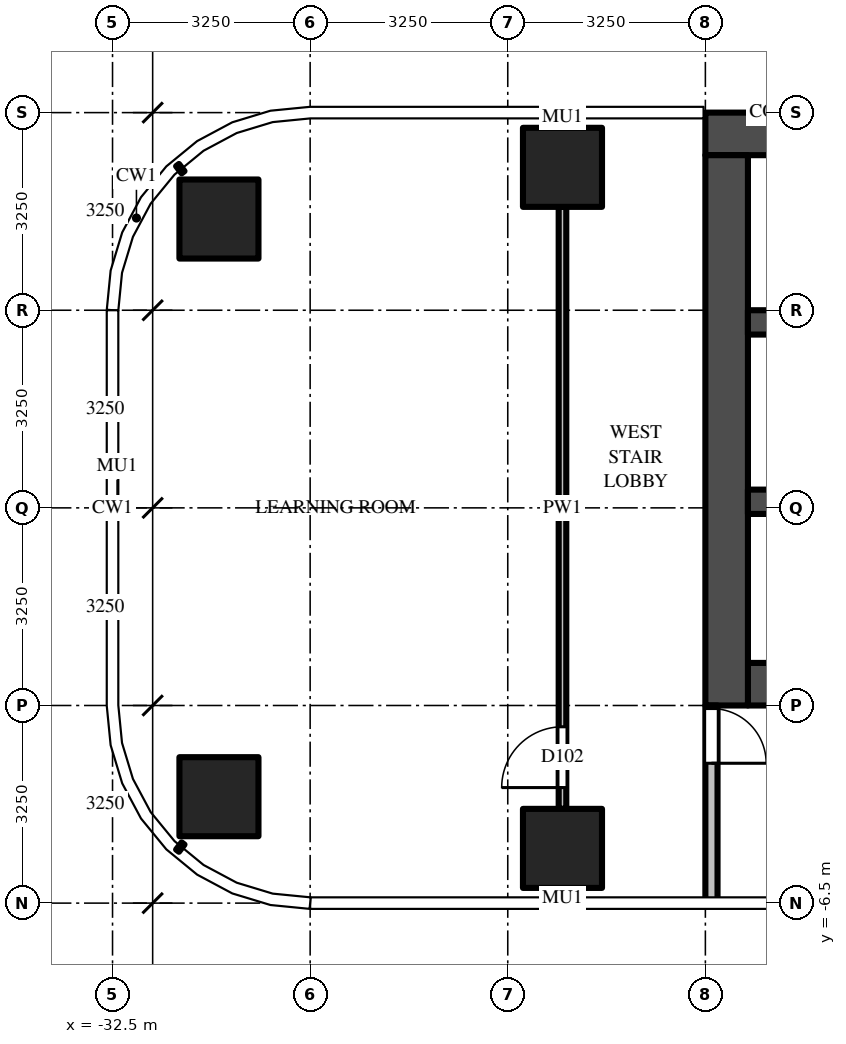
"""IFC4 building model, lengths in metres.
Left out: names, types, materials, properties, quantities, classifications, styles, units other than length and angle.
Written with IfcOpenShell. Run it as: python <this file> out.ifc"""

import sys

from ifc_helpers import new_model, si_unit, direction, frame, frame_2d, origin, origin_2d, place, context, subcontext, project, spatial, rectangle, extrude, source, transform, mapped, element, fill, save


model = new_model("IFC4")
c1 = context("Model", 3, precision=1e-05, world=origin(), true_north=direction((0.0, 1.0)))
c2 = subcontext(c1, "Body", "Model", "MODEL_VIEW")
j1 = project(units=[si_unit("LENGTHUNIT", "METRE"), si_unit("PLANEANGLEUNIT", "RADIAN")], contexts=[c1])
p1 = place(None, origin())
s1 = spatial("IfcSite", under=j1, at=p1, CompositionType="ELEMENT")
p2 = place(p1, origin())
s2 = spatial("IfcBuilding", under=s1, at=p2, CompositionType="ELEMENT")
p3 = place(p2, frame((0.0, 0.0, 115.5)))
s3 = spatial("IfcBuildingStorey", under=s2, at=p3, CompositionType="ELEMENT", Elevation=115.5)
m1 = source(origin(), c2, "Body", "SweptSolid", [
    extrude(rectangle(XDim=1.3, YDim=1.3, at=origin_2d()), origin(), (0.0, 0.0, 1.0), 4.5),
])
for number, where, z_axis, x_axis in (
    (1, (-25.1, -5.6, 0.0), (0.0, 0.0, 1.0), (1.0, 0.0, 0.0)),
    (2, (-30.75, -4.75, 0.0), (0.0, 0.0, 1.0), (1.0, 0.0, 0.0)),
    (3, (-25.1, 5.6, 0.0), (0.0, 0.0, 1.0), (1.0, 0.0, 0.0)),
    (4, (-30.75, 4.75, 0.0), (0.0, 0.0, 1.0), (1.0, 0.0, 0.0)),
):
    element("IfcColumn", number, at=place(p3, frame(where, z_axis=z_axis, x_axis=x_axis)), inside=s3, PredefinedType="COLUMN", context=c2, shape_type="MappedRepresentation", body=[
        mapped(m1, transform((0.0, 0.0, 0.0))),
    ])
m2 = source(origin(), c2, "Body", "SweptSolid", [
    extrude(rectangle(XDim=16.5, YDim=0.7, at=frame_2d((8.25, 0.0))), origin(), (0.0, 0.0, 1.0), 4.25),
])
p4 = place(p3, frame((-6.25, 6.15, 0.0), z_axis=(0.0, 0.0, 1.0), x_axis=(-1.0, 0.0, 0.0)))
e5 = element("IfcWall", 5, at=p4, inside=s3, PredefinedType="SHEAR", context=c2, shape_type="MappedRepresentation", body=[
    mapped(m2, transform((0.0, 0.0, 0.0))),
])
m3 = source(origin(), c2, "Body", "SweptSolid", [
    extrude(rectangle(XDim=14.85, YDim=0.7, at=frame_2d((7.425, 0.0))), origin(), (0.0, 0.0, 1.0), 4.25),
])
p5 = place(p3, frame((-7.2, -2.9, 0.0), z_axis=(0.0, 0.0, 1.0), x_axis=(-1.0, 0.0, 0.0)))
e6 = element("IfcWall", 6, at=p5, inside=s3, PredefinedType="SHEAR", context=c2, shape_type="MappedRepresentation", body=[
    mapped(m3, transform((0.0, 0.0, 0.0))),
])
m4 = source(origin(), c2, "Body", "SweptSolid", [
    extrude(rectangle(XDim=1.3, YDim=2.1, at=frame_2d((0.65, 1.05))), frame((0.0, 0.36, 0.0), z_axis=(0.0, -1.0, 0.0), x_axis=(1.0, 0.0, 0.0)), (0.0, 0.0, 1.0), 0.72),
])
p6 = place(p5, frame((12.2, 0.0, 0.0)))
e7 = element("IfcOpeningElement", 7, at=p6, cuts=e6, PredefinedType="OPENING", context=c2, shape_type="MappedRepresentation", body=[
    mapped(m4, transform((0.0, 0.0, 0.0))),
])
m5 = source(origin(), c2, "Body", "SweptSolid", [
    extrude(rectangle(XDim=1.2, YDim=2.1, at=frame_2d((0.6, 1.05))), frame((0.0, 0.36, 0.0), z_axis=(0.0, -1.0, 0.0), x_axis=(1.0, 0.0, 0.0)), (0.0, 0.0, 1.0), 0.72),
])
p7 = place(p5, frame((9.85, 0.0, 0.0)))
e8 = element("IfcOpeningElement", 8, at=p7, cuts=e6, PredefinedType="OPENING", context=c2, shape_type="MappedRepresentation", body=[
    mapped(m5, transform((0.0, 0.0, 0.0))),
])
m6 = source(origin(), c2, "Body", "SweptSolid", [
    extrude(rectangle(XDim=1.0, YDim=2.1, at=frame_2d((0.5, 1.05))), frame((0.0, 0.36, 0.0), z_axis=(0.0, -1.0, 0.0), x_axis=(1.0, 0.0, 0.0)), (0.0, 0.0, 1.0), 0.72),
])
p8 = place(p5, frame((7.9, 0.0, 0.0)))
e9 = element("IfcOpeningElement", 9, at=p8, cuts=e6, PredefinedType="OPENING", context=c2, shape_type="MappedRepresentation", body=[
    mapped(m6, transform((0.0, 0.0, 0.0))),
])
m7 = source(origin(), c2, "Body", "SweptSolid", [
    extrude(rectangle(XDim=0.8, YDim=2.1, at=frame_2d((0.4, 1.05))), frame((0.0, 0.36, 0.0), z_axis=(0.0, -1.0, 0.0), x_axis=(1.0, 0.0, 0.0)), (0.0, 0.0, 1.0), 0.72),
])
p9 = place(p5, frame((0.113, 0.0, 0.0)))
e10 = element("IfcOpeningElement", 10, at=p9, cuts=e6, PredefinedType="OPENING", context=c2, shape_type="MappedRepresentation", body=[
    mapped(m7, transform((0.0, 0.0, 0.0))),
])
p10 = place(p5, frame((1.288, 0.0, 0.0)))
e11 = element("IfcOpeningElement", 11, at=p10, cuts=e6, PredefinedType="OPENING", context=c2, shape_type="MappedRepresentation", body=[
    mapped(m7, transform((0.0, 0.0, 0.0))),
])
p11 = place(p5, frame((2.712, 0.0, 0.0)))
e12 = element("IfcOpeningElement", 12, at=p11, cuts=e6, PredefinedType="OPENING", context=c2, shape_type="MappedRepresentation", body=[
    mapped(m7, transform((0.0, 0.0, 0.0))),
])
p12 = place(p5, frame((3.887, 0.0, 0.0)))
e13 = element("IfcOpeningElement", 13, at=p12, cuts=e6, PredefinedType="OPENING", context=c2, shape_type="MappedRepresentation", body=[
    mapped(m7, transform((0.0, 0.0, 0.0))),
])
p13 = place(p5, frame((5.312, 0.0, 0.0)))
e14 = element("IfcOpeningElement", 14, at=p13, cuts=e6, PredefinedType="OPENING", context=c2, shape_type="MappedRepresentation", body=[
    mapped(m7, transform((0.0, 0.0, 0.0))),
])
p14 = place(p5, frame((6.488, 0.0, 0.0)))
e15 = element("IfcOpeningElement", 15, at=p14, cuts=e6, PredefinedType="OPENING", context=c2, shape_type="MappedRepresentation", body=[
    mapped(m7, transform((0.0, 0.0, 0.0))),
])
m8 = source(origin(), c2, "Body", "SweptSolid", [
    extrude(rectangle(XDim=9.05, YDim=0.7, at=frame_2d((4.525, 0.0))), origin(), (0.0, 0.0, 1.0), 4.25),
])
p15 = place(p3, frame((-22.4, 5.8, 0.0), z_axis=(0.0, 0.0, 1.0), x_axis=(0.0, -1.0, 0.0)))
e16 = element("IfcWall", 16, at=p15, inside=s3, PredefinedType="SHEAR", context=c2, shape_type="MappedRepresentation", body=[
    mapped(m8, transform((0.0, 0.0, 0.0))),
])
m9 = source(origin(), c2, "Body", "SweptSolid", [
    extrude(rectangle(XDim=14.85, YDim=0.4, at=frame_2d((7.425, 0.0))), origin(), (0.0, 0.0, 1.0), 4.25),
])
p16 = place(p3, frame((-7.2, 0.1, 0.0), z_axis=(0.0, 0.0, 1.0), x_axis=(-1.0, 0.0, 0.0)))
e17 = element("IfcWall", 17, at=p16, inside=s3, PredefinedType="SHEAR", context=c2, shape_type="MappedRepresentation", body=[
    mapped(m9, transform((0.0, 0.0, 0.0))),
])
m10 = source(origin(), c2, "Body", "SweptSolid", [
    extrude(rectangle(XDim=1.0, YDim=2.1, at=frame_2d((0.5, 1.05))), frame((0.0, 0.21, 0.0), z_axis=(0.0, -1.0, 0.0), x_axis=(1.0, 0.0, 0.0)), (0.0, 0.0, 1.0), 0.42),
])
p17 = place(p16, frame((7.9, 0.0, 0.0)))
e18 = element("IfcOpeningElement", 18, at=p17, cuts=e17, PredefinedType="OPENING", context=c2, shape_type="MappedRepresentation", body=[
    mapped(m10, transform((0.0, 0.0, 0.0))),
])
m11 = source(origin(), c2, "Body", "SweptSolid", [
    extrude(rectangle(XDim=5.7, YDim=0.4, at=frame_2d((2.85, 0.0))), origin(), (0.0, 0.0, 1.0), 4.25),
])
p18 = place(p3, frame((-16.35, 3.05, 0.0), z_axis=(0.0, 0.0, 1.0), x_axis=(-1.0, 0.0, 0.0)))
e19 = element("IfcWall", 19, at=p18, inside=s3, PredefinedType="SHEAR", context=c2, shape_type="MappedRepresentation", body=[
    mapped(m11, transform((0.0, 0.0, 0.0))),
])
m12 = source(origin(), c2, "Body", "SweptSolid", [
    extrude(rectangle(XDim=3.25, YDim=0.2, at=frame_2d((1.625, 0.0))), origin(), (0.0, 0.0, 1.0), 4.25),
])
p19 = place(p3, frame((-22.65, -3.25, 0.0), z_axis=(0.0, 0.0, 1.0), x_axis=(0.0, -1.0, 0.0)))
e20 = element("IfcWall", 20, at=p19, inside=s3, PredefinedType="PARTITIONING", context=c2, shape_type="MappedRepresentation", body=[
    mapped(m12, transform((0.0, 0.0, 0.0))),
])
m13 = source(origin(), c2, "Body", "SweptSolid", [
    extrude(rectangle(XDim=0.9, YDim=2.1, at=frame_2d((0.45, 1.05))), frame((0.0, 0.11, 0.0), z_axis=(0.0, -1.0, 0.0), x_axis=(1.0, 0.0, 0.0)), (0.0, 0.0, 1.0), 0.22),
])
p20 = place(p19, frame((0.05, 0.0, 0.0)))
e21 = element("IfcOpeningElement", 21, at=p20, cuts=e20, PredefinedType="OPENING", context=c2, shape_type="MappedRepresentation", body=[
    mapped(m13, transform((0.0, 0.0, 0.0))),
])
m14 = source(origin(), c2, "Body", "SweptSolid", [
    extrude(rectangle(XDim=9.9, YDim=0.125, at=frame_2d((4.95, 0.0))), origin(), (0.0, 0.0, 1.0), 3.468),
])
p21 = place(p3, frame((-25.1, -4.95, 0.0), z_axis=(0.0, 0.0, 1.0), x_axis=(0.0, 1.0, 0.0)))
e22 = element("IfcWall", 22, at=p21, inside=s3, PredefinedType="PARTITIONING", context=c2, shape_type="MappedRepresentation", body=[
    mapped(m14, transform((0.0, 0.0, 0.0))),
])
m15 = source(origin(), c2, "Body", "SweptSolid", [
    extrude(rectangle(XDim=1.0, YDim=2.1, at=frame_2d((0.5, 1.05))), frame((0.0, 0.073, 0.0), z_axis=(0.0, -1.0, 0.0), x_axis=(1.0, 0.0, 0.0)), (0.0, 0.0, 1.0), 0.145),
])
p22 = place(p21, frame((0.35, 0.0, 0.0)))
e23 = element("IfcOpeningElement", 23, at=p22, cuts=e22, PredefinedType="OPENING", context=c2, shape_type="MappedRepresentation", body=[
    mapped(m15, transform((0.0, 0.0, 0.0))),
])
m16 = source(origin(), c2, "Body", "SweptSolid", [
    extrude(rectangle(XDim=0.9, YDim=2.1, at=frame_2d((0.45, 1.05))), frame((0.0, 0.025, 0.0), z_axis=(0.0, -1.0, 0.0), x_axis=(1.0, 0.0, 0.0)), (0.0, 0.0, 1.0), 0.05),
])
p23 = place(p20, origin())
e24 = element("IfcDoor", 24, at=p23, inside=s3, OperationType="SINGLE_SWING_RIGHT", PredefinedType="DOOR", context=c2, shape_type="MappedRepresentation", body=[
    mapped(m16, transform((0.0, 0.0, 0.0))),
])
fill(e21, e24)
m17 = source(origin(), c2, "Body", "SweptSolid", [
    extrude(rectangle(XDim=1.0, YDim=2.1, at=frame_2d((0.5, 1.05))), frame((0.0, 0.025, 0.0), z_axis=(0.0, -1.0, 0.0), x_axis=(1.0, 0.0, 0.0)), (0.0, 0.0, 1.0), 0.05),
])
p24 = place(p22, origin())
e25 = element("IfcDoor", 25, at=p24, inside=s3, OperationType="SINGLE_SWING_LEFT", PredefinedType="DOOR", context=c2, shape_type="MappedRepresentation", body=[
    mapped(m17, transform((0.0, 0.0, 0.0))),
])
fill(e23, e25)
save(model, sys.argv[1])
